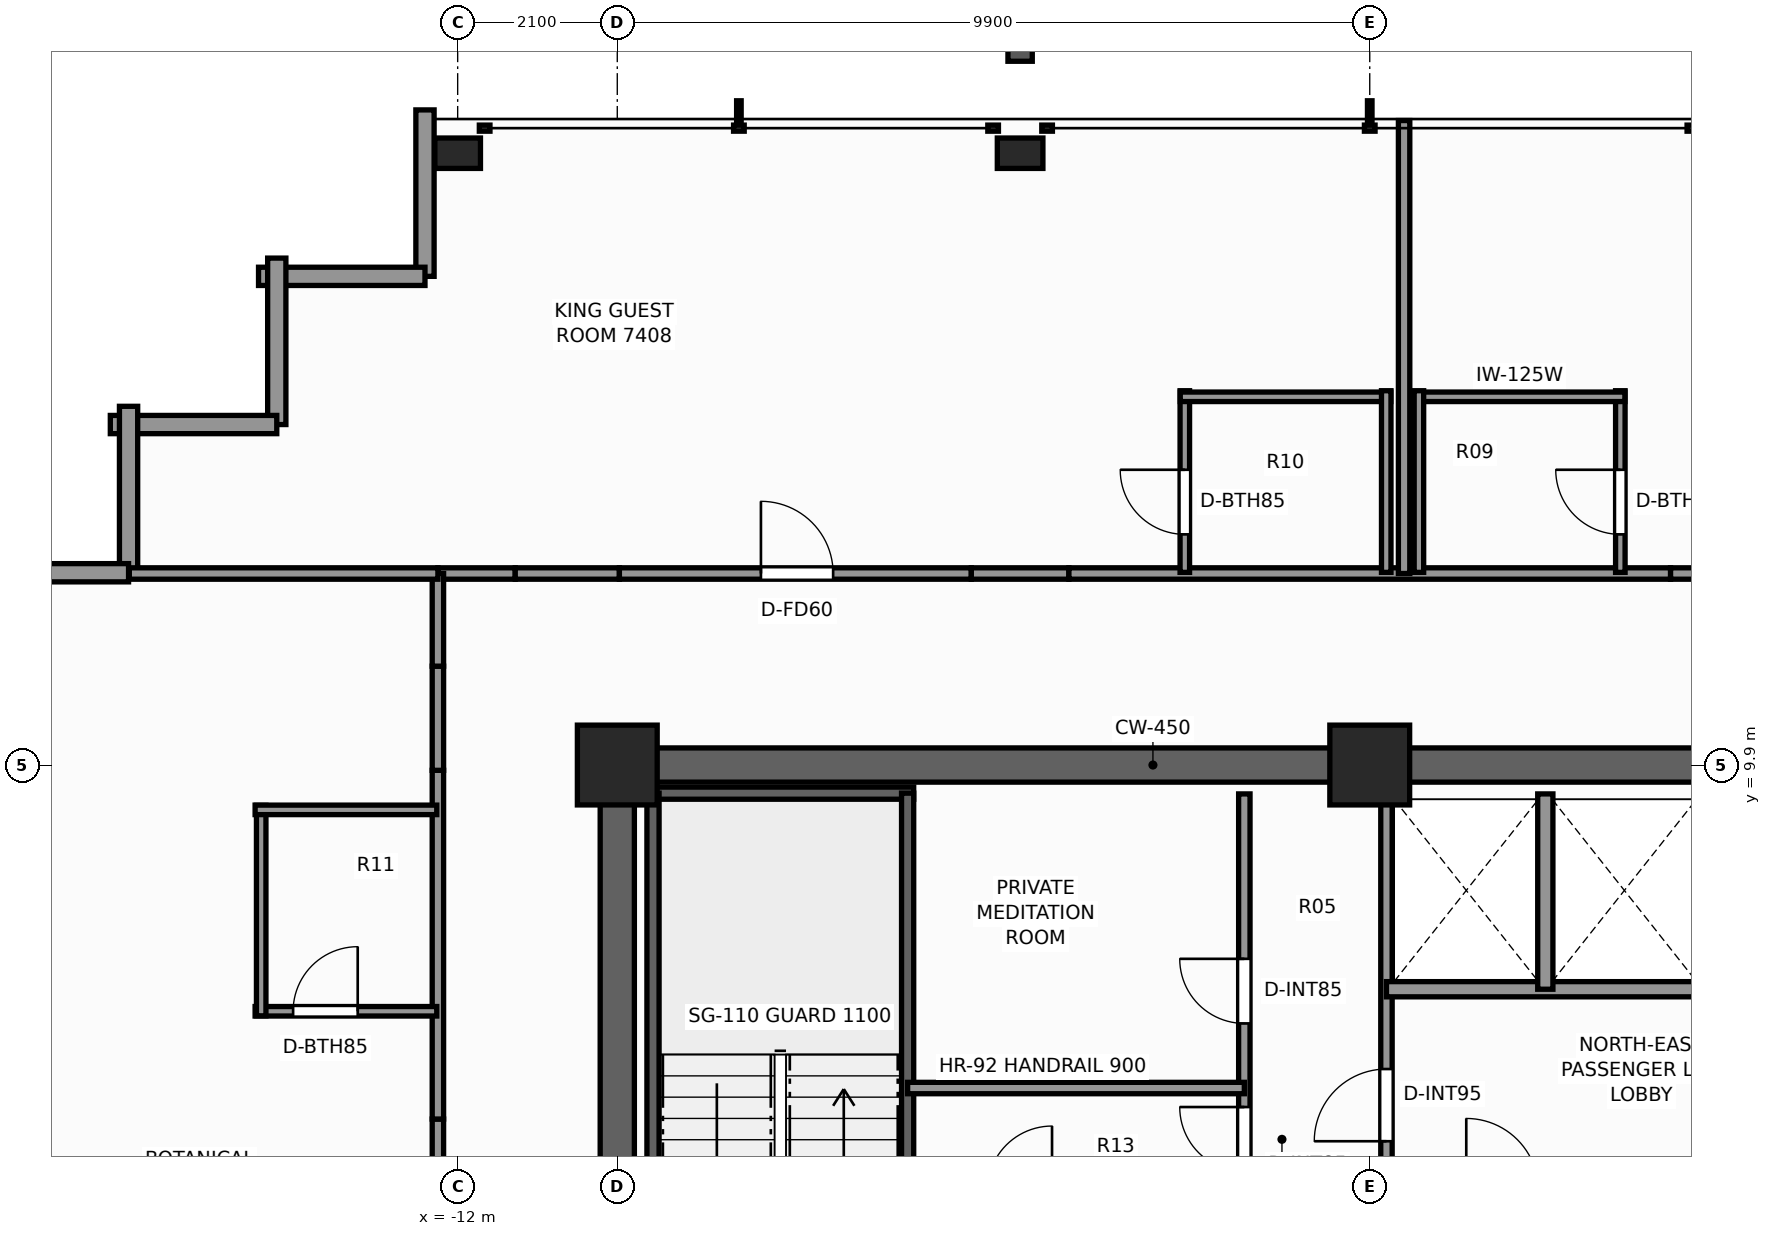
"""IFC4 building model, lengths in metres.
Left out: names, types, materials, properties, quantities, classifications, styles, units other than length and angle.
Written with IfcOpenShell. Run it as: python <this file> out.ifc"""

import sys

from ifc_helpers import new_model, si_unit, direction, frame, frame_2d, origin, origin_2d, place, context, subcontext, project, spatial, rectangle, extrude, element, fill, save


model = new_model("IFC4")
c1 = context("Model", 3, precision=1e-05, world=origin(), true_north=direction((0.0, 1.0)))
c2 = subcontext(c1, "Body", "Model", "MODEL_VIEW")
j1 = project(units=[si_unit("LENGTHUNIT", "METRE"), si_unit("PLANEANGLEUNIT", "RADIAN")], contexts=[c1])
p1 = place(None, origin())
s1 = spatial("IfcSite", under=j1, at=p1, CompositionType="ELEMENT")
p2 = place(p1, origin())
s2 = spatial("IfcBuilding", under=s1, at=p2, CompositionType="ELEMENT")
p3 = place(p2, frame((0.0, 0.0, 254.9)))
s3 = spatial("IfcBuildingStorey", under=s2, at=p3, CompositionType="ELEMENT", Elevation=254.9)
p4 = place(p3, frame((-10.125, 9.9, 0.0), z_axis=(0.0, 0.0, 1.0), x_axis=(1.0, 0.0, 0.0)))
e1 = element("IfcWall", 1, at=p4, inside=s3, PredefinedType="SHEAR", context=c2, shape_type="SweptSolid", body=[
    extrude(rectangle(XDim=14.545, YDim=0.45, at=frame_2d((7.272, 0.0))), origin(), (0.0, 0.0, 1.0), 3.5),
])
p5 = place(p3, frame((-9.9, -3.7, 0.0), z_axis=(0.0, 0.0, 1.0), x_axis=(0.0, 1.0, 0.0)))
e2 = element("IfcWall", 2, at=p5, inside=s3, PredefinedType="SHEAR", context=c2, shape_type="SweptSolid", body=[
    extrude(rectangle(XDim=13.375, YDim=0.45, at=frame_2d((6.688, 0.0))), origin(), (0.0, 0.0, 1.0), 3.5),
])
p6 = place(p5, frame((0.35, 0.0, 0.0)))
e3 = element("IfcOpeningElement", 3, at=p6, cuts=e2, PredefinedType="OPENING", context=c2, shape_type="SweptSolid", body=[
    extrude(rectangle(XDim=1.1, YDim=2.2, at=frame_2d((0.55, 1.1))), frame((0.0, 0.235, 0.0), z_axis=(0.0, -1.0, 0.0), x_axis=(1.0, 0.0, 0.0)), (0.0, 0.0, 1.0), 0.47),
])
for number, where, z_axis, x_axis in (
    (4, (-9.9, 9.9, 0.0), (0.0, 0.0, 1.0), (1.0, 0.0, 0.0)),
    (5, (0.0, 9.9, 0.0), (0.0, 0.0, 1.0), (1.0, 0.0, 0.0)),
):
    element("IfcColumn", number, at=place(p3, frame(where, z_axis=z_axis, x_axis=x_axis)), inside=s3, PredefinedType="COLUMN", context=c2, shape_type="SweptSolid", body=[
        extrude(rectangle(XDim=1.05, YDim=1.05, at=origin_2d()), origin(), (0.0, 0.0, 1.0), 3.5),
    ])
for number, where, z_axis, x_axis in (
    (6, (-12.0, 17.95, 0.0), (0.0, 0.0, 1.0), (1.0, 0.0, 0.0)),
    (7, (-4.6, 17.95, 0.0), (0.0, 0.0, 1.0), (1.0, 0.0, 0.0)),
):
    element("IfcColumn", number, at=place(p3, frame(where, z_axis=z_axis, x_axis=x_axis)), inside=s3, PredefinedType="COLUMN", context=c2, shape_type="SweptSolid", body=[
        extrude(rectangle(XDim=0.6, YDim=0.4, at=origin_2d()), origin(), (0.0, 0.0, 1.0), 3.5),
    ])
p7 = place(p3, frame((-12.43, 16.33, 0.0), z_axis=(0.0, 0.0, 1.0), x_axis=(0.0, 1.0, 0.0)))
e8 = element("IfcWall", 8, at=p7, inside=s3, PredefinedType="STANDARD", context=c2, shape_type="SweptSolid", body=[
    extrude(rectangle(XDim=2.19, YDim=0.24, at=frame_2d((1.095, 0.0))), origin(), (0.0, 0.0, 1.0), 1.415),
])
for number, where, z_axis, x_axis in (
    (9, (-14.62, 16.33, 0.0), (0.0, 0.0, 1.0), (1.0, 0.0, 0.0)),
    (10, (-14.38, 14.38, 0.0), (0.0, 0.0, 1.0), (0.0, 1.0, 0.0)),
    (11, (-16.57, 14.38, 0.0), (0.0, 0.0, 1.0), (1.0, 0.0, 0.0)),
    (12, (-16.33, 12.43, 0.0), (0.0, 0.0, 1.0), (0.0, 1.0, 0.0)),
):
    element("IfcWall", number, at=place(p3, frame(where, z_axis=z_axis, x_axis=x_axis)), inside=s3, PredefinedType="STANDARD", context=c2, shape_type="SweptSolid", body=[
        extrude(rectangle(XDim=2.19, YDim=0.24, at=frame_2d((1.095, 0.0))), origin(), (0.0, 0.0, 1.0), 2.603),
    ])
p8 = place(p3, frame((-18.52, 12.43, 0.0), z_axis=(0.0, 0.0, 1.0), x_axis=(1.0, 0.0, 0.0)))
e13 = element("IfcWall", 13, at=p8, inside=s3, PredefinedType="STANDARD", context=c2, shape_type="SweptSolid", body=[
    extrude(rectangle(XDim=2.19, YDim=0.24, at=frame_2d((1.095, 0.0))), origin(), (0.0, 0.0, 1.0), 1.415),
])
p9 = place(p3, frame((-9.52, 9.53, 0.0), z_axis=(0.0, 0.0, 1.0), x_axis=(1.0, 0.0, 0.0)))
e14 = element("IfcWall", 14, at=p9, inside=s3, PredefinedType="SHEAR", context=c2, shape_type="SweptSolid", body=[
    extrude(rectangle(XDim=3.52, YDim=0.16, at=frame_2d((1.76, 0.0))), origin(), (0.0, 0.0, 1.0), 3.5),
])
for number, where, z_axis, x_axis in (
    (15, (-9.43, 1.97, 0.0), (0.0, 0.0, 1.0), (0.0, 1.0, 0.0)),
    (16, (-6.08, 1.97, 0.0), (0.0, 0.0, 1.0), (0.0, 1.0, 0.0)),
):
    element("IfcWall", number, at=place(p3, frame(where, z_axis=z_axis, x_axis=x_axis)), inside=s3, PredefinedType="SHEAR", context=c2, shape_type="SweptSolid", body=[
        extrude(rectangle(XDim=7.56, YDim=0.16, at=frame_2d((3.78, 0.0))), origin(), (0.0, 0.0, 1.0), 3.5),
    ])
p10 = place(p3, frame((0.22, 4.3, 0.0), z_axis=(0.0, 0.0, 1.0), x_axis=(0.0, 1.0, 0.0)))
e17 = element("IfcWall", 17, at=p10, inside=s3, PredefinedType="PARTITIONING", context=c2, shape_type="SweptSolid", body=[
    extrude(rectangle(XDim=5.22, YDim=0.15, at=frame_2d((2.61, 0.0))), origin(), (0.0, 0.0, 1.0), 3.22),
])
p11 = place(p10, frame((0.65, 0.0, 0.0)))
e18 = element("IfcOpeningElement", 18, at=p11, cuts=e17, PredefinedType="OPENING", context=c2, shape_type="SweptSolid", body=[
    extrude(rectangle(XDim=0.95, YDim=2.06, at=frame_2d((0.475, 1.03))), frame((0.0, 0.085, 0.0), z_axis=(0.0, -1.0, 0.0), x_axis=(1.0, 0.0, 0.0)), (0.0, 0.0, 1.0), 0.17),
])
p12 = place(p3, frame((-1.65, 4.3, 0.0), z_axis=(0.0, 0.0, 1.0), x_axis=(0.0, 1.0, 0.0)))
e19 = element("IfcWall", 19, at=p12, inside=s3, PredefinedType="PARTITIONING", context=c2, shape_type="SweptSolid", body=[
    extrude(rectangle(XDim=5.22, YDim=0.15, at=frame_2d((2.61, 0.0))), origin(), (0.0, 0.0, 1.0), 3.22),
])
p13 = place(p12, frame((2.2, 0.0, 0.0)))
e20 = element("IfcOpeningElement", 20, at=p13, cuts=e19, PredefinedType="OPENING", context=c2, shape_type="SweptSolid", body=[
    extrude(rectangle(XDim=0.85, YDim=2.03, at=frame_2d((0.425, 1.015))), frame((0.0, 0.085, 0.0), z_axis=(0.0, -1.0, 0.0), x_axis=(1.0, 0.0, 0.0)), (0.0, 0.0, 1.0), 0.17),
])
p14 = place(p12, frame((0.25, 0.0, 0.0)))
e21 = element("IfcOpeningElement", 21, at=p14, cuts=e19, PredefinedType="OPENING", context=c2, shape_type="SweptSolid", body=[
    extrude(rectangle(XDim=0.85, YDim=2.03, at=frame_2d((0.425, 1.015))), frame((0.0, 0.085, 0.0), z_axis=(0.0, -1.0, 0.0), x_axis=(1.0, 0.0, 0.0)), (0.0, 0.0, 1.0), 0.17),
])
p15 = place(p3, frame((-6.08, 5.65, 0.0), z_axis=(0.0, 0.0, 1.0), x_axis=(1.0, 0.0, 0.0)))
e22 = element("IfcWall", 22, at=p15, inside=s3, PredefinedType="PARTITIONING", context=c2, shape_type="SweptSolid", body=[
    extrude(rectangle(XDim=4.43, YDim=0.15, at=frame_2d((2.215, 0.0))), origin(), (0.0, 0.0, 1.0), 3.22),
])
p16 = place(p3, frame((0.22, 6.95, 0.0), z_axis=(0.0, 0.0, 1.0), x_axis=(1.0, 0.0, 0.0)))
e23 = element("IfcWall", 23, at=p16, inside=s3, PredefinedType="SOLIDWALL", context=c2, shape_type="SweptSolid", body=[
    extrude(rectangle(XDim=4.18, YDim=0.2, at=frame_2d((2.09, 0.0))), origin(), (0.0, 0.0, 1.0), 3.22),
])
p17 = place(p3, frame((2.31, 6.95, 0.0), z_axis=(0.0, 0.0, 1.0), x_axis=(0.0, 1.0, 0.0)))
e24 = element("IfcWall", 24, at=p17, inside=s3, PredefinedType="SOLIDWALL", context=c2, shape_type="SweptSolid", body=[
    extrude(rectangle(XDim=2.57, YDim=0.2, at=frame_2d((1.285, 0.0))), origin(), (0.0, 0.0, 1.0), 3.22),
])
p18 = place(p3, frame((-12.26, 12.42, 0.0), z_axis=(0.0, 0.0, 1.0), x_axis=(1.0, 0.0, 0.0)))
e25 = element("IfcWall", 25, at=p18, inside=s3, PredefinedType="PARTITIONING", context=c2, shape_type="SweptSolid", body=[
    extrude(rectangle(XDim=1.018, YDim=0.15, at=frame_2d((0.509, 0.0))), origin(), (0.0, 0.0, 1.0), 3.22),
])
p19 = place(p3, frame((-11.242, 12.42, 0.0), z_axis=(0.0, 0.0, 1.0), x_axis=(1.0, 0.0, 0.0)))
e26 = element("IfcWall", 26, at=p19, inside=s3, PredefinedType="PARTITIONING", context=c2, shape_type="SweptSolid", body=[
    extrude(rectangle(XDim=1.37, YDim=0.15, at=frame_2d((0.685, 0.0))), origin(), (0.0, 0.0, 1.0), 1.405),
])
p20 = place(p3, frame((-9.872, 12.42, 0.0), z_axis=(0.0, 0.0, 1.0), x_axis=(1.0, 0.0, 0.0)))
e27 = element("IfcWall", 27, at=p20, inside=s3, PredefinedType="PARTITIONING", context=c2, shape_type="SweptSolid", body=[
    extrude(rectangle(XDim=4.63, YDim=0.15, at=frame_2d((2.315, 0.0))), origin(), (0.0, 0.0, 1.0), 3.22),
])
p21 = place(p20, frame((1.862, 0.0, 0.0)))
e28 = element("IfcOpeningElement", 28, at=p21, cuts=e27, PredefinedType="OPENING", context=c2, shape_type="SweptSolid", body=[
    extrude(rectangle(XDim=0.95, YDim=2.06, at=frame_2d((0.475, 1.03))), frame((0.0, 0.085, 0.0), z_axis=(0.0, -1.0, 0.0), x_axis=(1.0, 0.0, 0.0)), (0.0, 0.0, 1.0), 0.17),
])
p22 = place(p3, frame((-5.242, 12.42, 0.0), z_axis=(0.0, 0.0, 1.0), x_axis=(1.0, 0.0, 0.0)))
e29 = element("IfcWall", 29, at=p22, inside=s3, PredefinedType="PARTITIONING", context=c2, shape_type="SweptSolid", body=[
    extrude(rectangle(XDim=1.284, YDim=0.15, at=frame_2d((0.642, 0.0))), origin(), (0.0, 0.0, 1.0), 1.405),
])
p23 = place(p3, frame((-3.958, 12.42, 0.0), z_axis=(0.0, 0.0, 1.0), x_axis=(1.0, 0.0, 0.0)))
e30 = element("IfcWall", 30, at=p23, inside=s3, PredefinedType="PARTITIONING", context=c2, shape_type="SweptSolid", body=[
    extrude(rectangle(XDim=7.916, YDim=0.15, at=frame_2d((3.958, 0.0))), origin(), (0.0, 0.0, 1.0), 2.745),
])
for number, where, z_axis, x_axis in (
    (31, (3.958, 12.42, 0.0), (0.0, 0.0, 1.0), (1.0, 0.0, 0.0)),
    (32, (-12.26, 3.958, 0.0), (0.0, 0.0, 1.0), (0.0, 1.0, 0.0)),
):
    element("IfcWall", number, at=place(p3, frame(where, z_axis=z_axis, x_axis=x_axis)), inside=s3, PredefinedType="PARTITIONING", context=c2, shape_type="SweptSolid", body=[
        extrude(rectangle(XDim=1.284, YDim=0.15, at=frame_2d((0.642, 0.0))), origin(), (0.0, 0.0, 1.0), 1.405),
    ])
p24 = place(p3, frame((-12.26, 5.242, 0.0), z_axis=(0.0, 0.0, 1.0), x_axis=(0.0, 1.0, 0.0)))
e33 = element("IfcWall", 33, at=p24, inside=s3, PredefinedType="PARTITIONING", context=c2, shape_type="SweptSolid", body=[
    extrude(rectangle(XDim=4.588, YDim=0.15, at=frame_2d((2.294, 0.0))), origin(), (0.0, 0.0, 1.0), 3.22),
])
p25 = place(p3, frame((-12.26, 9.83, 0.0), z_axis=(0.0, 0.0, 1.0), x_axis=(0.0, 1.0, 0.0)))
e34 = element("IfcWall", 34, at=p25, inside=s3, PredefinedType="PARTITIONING", context=c2, shape_type="SweptSolid", body=[
    extrude(rectangle(XDim=1.37, YDim=0.15, at=frame_2d((0.685, 0.0))), origin(), (0.0, 0.0, 1.0), 1.405),
])
p26 = place(p3, frame((-12.26, 11.201, 0.0), z_axis=(0.0, 0.0, 1.0), x_axis=(0.0, 1.0, 0.0)))
e35 = element("IfcWall", 35, at=p26, inside=s3, PredefinedType="PARTITIONING", context=c2, shape_type="SweptSolid", body=[
    extrude(rectangle(XDim=1.219, YDim=0.15, at=frame_2d((0.61, 0.0))), origin(), (0.0, 0.0, 1.0), 3.22),
])
p27 = place(p3, frame((-16.32, 12.42, 0.0), z_axis=(0.0, 0.0, 1.0), x_axis=(1.0, 0.0, 0.0)))
e36 = element("IfcWall", 36, at=p27, inside=s3, PredefinedType="PARTITIONING", context=c2, shape_type="SweptSolid", body=[
    extrude(rectangle(XDim=4.06, YDim=0.15, at=frame_2d((2.03, 0.0))), origin(), (0.0, 0.0, 1.0), 3.22),
])
p28 = place(p3, frame((-14.665, 6.66, 0.0), z_axis=(0.0, 0.0, 1.0), x_axis=(1.0, 0.0, 0.0)))
e37 = element("IfcWall", 37, at=p28, inside=s3, PredefinedType="PARTITIONING", context=c2, shape_type="SweptSolid", body=[
    extrude(rectangle(XDim=2.39, YDim=0.125, at=frame_2d((1.195, 0.0))), origin(), (0.0, 0.0, 1.0), 3.22),
])
p29 = place(p28, frame((0.5, 0.0, 0.0)))
e38 = element("IfcOpeningElement", 38, at=p29, cuts=e37, PredefinedType="OPENING", context=c2, shape_type="SweptSolid", body=[
    extrude(rectangle(XDim=0.85, YDim=2.03, at=frame_2d((0.425, 1.015))), frame((0.0, 0.073, 0.0), z_axis=(0.0, -1.0, 0.0), x_axis=(1.0, 0.0, 0.0)), (0.0, 0.0, 1.0), 0.145),
])
p30 = place(p3, frame((-14.585, 6.6, 0.0), z_axis=(0.0, 0.0, 1.0), x_axis=(0.0, 1.0, 0.0)))
e39 = element("IfcWall", 39, at=p30, inside=s3, PredefinedType="PARTITIONING", context=c2, shape_type="SweptSolid", body=[
    extrude(rectangle(XDim=2.77, YDim=0.125, at=frame_2d((1.385, 0.0))), origin(), (0.0, 0.0, 1.0), 3.22),
])
p31 = place(p3, frame((-14.665, 9.31, 0.0), z_axis=(0.0, 0.0, 1.0), x_axis=(1.0, 0.0, 0.0)))
e40 = element("IfcWall", 40, at=p31, inside=s3, PredefinedType="PARTITIONING", context=c2, shape_type="SweptSolid", body=[
    extrude(rectangle(XDim=2.39, YDim=0.125, at=frame_2d((1.195, 0.0))), origin(), (0.0, 0.0, 1.0), 3.22),
])
p32 = place(p3, frame((0.452, 12.42, 0.0), z_axis=(0.0, 0.0, 1.0), x_axis=(0.0, 1.0, 0.0)))
e41 = element("IfcWall", 41, at=p32, inside=s3, PredefinedType="PARTITIONING", context=c2, shape_type="SweptSolid", body=[
    extrude(rectangle(XDim=5.96, YDim=0.15, at=frame_2d((2.98, 0.0))), origin(), (0.0, 0.0, 1.0), 2.593),
])
p33 = place(p3, frame((-2.433, 12.435, 0.0), z_axis=(0.0, 0.0, 1.0), x_axis=(0.0, 1.0, 0.0)))
e42 = element("IfcWall", 42, at=p33, inside=s3, PredefinedType="PARTITIONING", context=c2, shape_type="SweptSolid", body=[
    extrude(rectangle(XDim=2.39, YDim=0.125, at=frame_2d((1.195, 0.0))), origin(), (0.0, 0.0, 1.0), 3.22),
])
p34 = place(p33, frame((0.5, 0.0, 0.0)))
e43 = element("IfcOpeningElement", 43, at=p34, cuts=e42, PredefinedType="OPENING", context=c2, shape_type="SweptSolid", body=[
    extrude(rectangle(XDim=0.85, YDim=2.03, at=frame_2d((0.425, 1.015))), frame((0.0, 0.073, 0.0), z_axis=(0.0, -1.0, 0.0), x_axis=(1.0, 0.0, 0.0)), (0.0, 0.0, 1.0), 0.145),
])
p35 = place(p3, frame((-2.493, 14.745, 0.0), z_axis=(0.0, 0.0, 1.0), x_axis=(1.0, 0.0, 0.0)))
e44 = element("IfcWall", 44, at=p35, inside=s3, PredefinedType="PARTITIONING", context=c2, shape_type="SweptSolid", body=[
    extrude(rectangle(XDim=2.77, YDim=0.125, at=frame_2d((1.385, 0.0))), origin(), (0.0, 0.0, 1.0), 2.745),
])
p36 = place(p3, frame((0.217, 12.435, 0.0), z_axis=(0.0, 0.0, 1.0), x_axis=(0.0, 1.0, 0.0)))
e45 = element("IfcWall", 45, at=p36, inside=s3, PredefinedType="PARTITIONING", context=c2, shape_type="SweptSolid", body=[
    extrude(rectangle(XDim=2.39, YDim=0.125, at=frame_2d((1.195, 0.0))), origin(), (0.0, 0.0, 1.0), 3.22),
])
p37 = place(p3, frame((3.297, 12.435, 0.0), z_axis=(0.0, 0.0, 1.0), x_axis=(0.0, 1.0, 0.0)))
e46 = element("IfcWall", 46, at=p37, inside=s3, PredefinedType="PARTITIONING", context=c2, shape_type="SweptSolid", body=[
    extrude(rectangle(XDim=2.39, YDim=0.125, at=frame_2d((1.195, 0.0))), origin(), (0.0, 0.0, 1.0), 3.22),
])
p38 = place(p37, frame((0.5, 0.0, 0.0)))
e47 = element("IfcOpeningElement", 47, at=p38, cuts=e46, PredefinedType="OPENING", context=c2, shape_type="SweptSolid", body=[
    extrude(rectangle(XDim=0.85, YDim=2.03, at=frame_2d((0.425, 1.015))), frame((0.0, 0.073, 0.0), z_axis=(0.0, -1.0, 0.0), x_axis=(1.0, 0.0, 0.0)), (0.0, 0.0, 1.0), 0.145),
])
p39 = place(p3, frame((0.587, 14.745, 0.0), z_axis=(0.0, 0.0, 1.0), x_axis=(1.0, 0.0, 0.0)))
e48 = element("IfcWall", 48, at=p39, inside=s3, PredefinedType="PARTITIONING", context=c2, shape_type="SweptSolid", body=[
    extrude(rectangle(XDim=2.77, YDim=0.125, at=frame_2d((1.385, 0.0))), origin(), (0.0, 0.0, 1.0), 3.22),
])
p40 = place(p3, frame((0.647, 12.435, 0.0), z_axis=(0.0, 0.0, 1.0), x_axis=(0.0, 1.0, 0.0)))
e49 = element("IfcWall", 49, at=p40, inside=s3, PredefinedType="PARTITIONING", context=c2, shape_type="SweptSolid", body=[
    extrude(rectangle(XDim=2.39, YDim=0.125, at=frame_2d((1.195, 0.0))), origin(), (0.0, 0.0, 1.0), 3.22),
])
p41 = place(p11, origin())
e50 = element("IfcDoor", 50, at=p41, inside=s3, OperationType="SINGLE_SWING_LEFT", PredefinedType="DOOR", context=c2, shape_type="SweptSolid", body=[
    extrude(rectangle(XDim=0.95, YDim=2.06, at=frame_2d((0.475, 1.03))), frame((0.0, 0.025, 0.0), z_axis=(0.0, -1.0, 0.0), x_axis=(1.0, 0.0, 0.0)), (0.0, 0.0, 1.0), 0.05),
])
fill(e18, e50)
p42 = place(p13, origin())
e51 = element("IfcDoor", 51, at=p42, inside=s3, OperationType="SINGLE_SWING_RIGHT", PredefinedType="DOOR", context=c2, shape_type="SweptSolid", body=[
    extrude(rectangle(XDim=0.85, YDim=2.03, at=frame_2d((0.425, 1.015))), frame((0.0, 0.025, 0.0), z_axis=(0.0, -1.0, 0.0), x_axis=(1.0, 0.0, 0.0)), (0.0, 0.0, 1.0), 0.05),
])
fill(e20, e51)
p43 = place(p14, origin())
e52 = element("IfcDoor", 52, at=p43, inside=s3, OperationType="SINGLE_SWING_RIGHT", PredefinedType="DOOR", context=c2, shape_type="SweptSolid", body=[
    extrude(rectangle(XDim=0.85, YDim=2.03, at=frame_2d((0.425, 1.015))), frame((0.0, 0.025, 0.0), z_axis=(0.0, -1.0, 0.0), x_axis=(1.0, 0.0, 0.0)), (0.0, 0.0, 1.0), 0.05),
])
fill(e21, e52)
p44 = place(p29, origin())
e53 = element("IfcDoor", 53, at=p44, inside=s3, OperationType="SINGLE_SWING_RIGHT", PredefinedType="DOOR", context=c2, shape_type="SweptSolid", body=[
    extrude(rectangle(XDim=0.85, YDim=2.03, at=frame_2d((0.425, 1.015))), frame((0.0, 0.025, 0.0), z_axis=(0.0, -1.0, 0.0), x_axis=(1.0, 0.0, 0.0)), (0.0, 0.0, 1.0), 0.05),
])
fill(e38, e53)
p45 = place(p34, origin())
e54 = element("IfcDoor", 54, at=p45, inside=s3, OperationType="SINGLE_SWING_RIGHT", PredefinedType="DOOR", context=c2, shape_type="SweptSolid", body=[
    extrude(rectangle(XDim=0.85, YDim=2.03, at=frame_2d((0.425, 1.015))), frame((0.0, 0.025, 0.0), z_axis=(0.0, -1.0, 0.0), x_axis=(1.0, 0.0, 0.0)), (0.0, 0.0, 1.0), 0.05),
])
fill(e43, e54)
p46 = place(p21, origin())
e55 = element("IfcDoor", 55, at=p46, inside=s3, OperationType="SINGLE_SWING_LEFT", PredefinedType="DOOR", context=c2, shape_type="SweptSolid", body=[
    extrude(rectangle(XDim=0.95, YDim=2.06, at=frame_2d((0.475, 1.03))), frame((0.0, 0.025, 0.0), z_axis=(0.0, -1.0, 0.0), x_axis=(1.0, 0.0, 0.0)), (0.0, 0.0, 1.0), 0.05),
])
fill(e28, e55)
p47 = place(p38, origin())
e56 = element("IfcDoor", 56, at=p47, inside=s3, OperationType="SINGLE_SWING_RIGHT", PredefinedType="DOOR", context=c2, shape_type="SweptSolid", body=[
    extrude(rectangle(XDim=0.85, YDim=2.03, at=frame_2d((0.425, 1.015))), frame((0.0, 0.025, 0.0), z_axis=(0.0, -1.0, 0.0), x_axis=(1.0, 0.0, 0.0)), (0.0, 0.0, 1.0), 0.05),
])
fill(e47, e56)
save(model, sys.argv[1])
